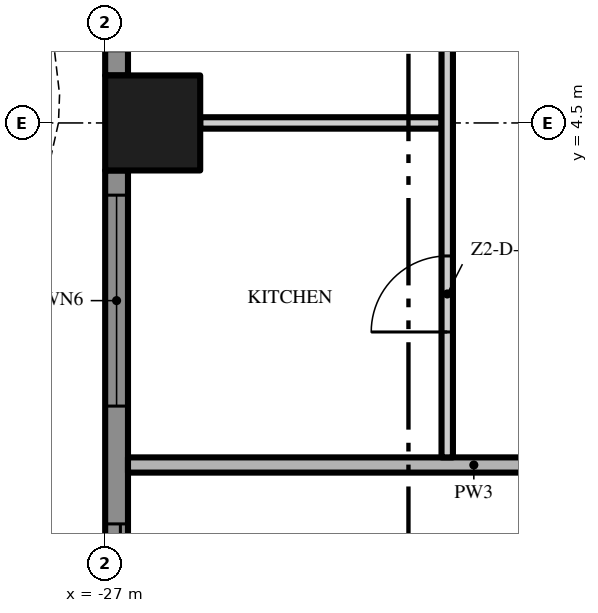
"""IFC4 building model, lengths in metres.
Left out: names, types, materials, properties, quantities, classifications, styles, units other than length and angle.
Written with IfcOpenShell. Run it as: python <this file> out.ifc"""

import sys

from ifc_helpers import new_model, si_unit, direction, frame, frame_2d, origin, origin_2d, place, context, subcontext, project, spatial, polyline, rectangle, outline, extrude, element, fill, save


model = new_model("IFC4")
c1 = context("Model", 3, precision=1e-05, world=origin(), true_north=direction((0.0, 1.0)))
c2 = subcontext(c1, "Body", "Model", "MODEL_VIEW")
j1 = project(units=[si_unit("LENGTHUNIT", "METRE"), si_unit("PLANEANGLEUNIT", "RADIAN")], contexts=[c1])
p1 = place(None, origin())
s1 = spatial("IfcSite", under=j1, at=p1, CompositionType="ELEMENT")
p2 = place(p1, origin())
s2 = spatial("IfcBuilding", under=s1, at=p2, CompositionType="ELEMENT")
p3 = place(p2, frame((0.0, 0.0, 103.6)))
s3 = spatial("IfcBuildingStorey", under=s2, at=p3, CompositionType="ELEMENT", Elevation=103.6)
p4 = place(p3, frame((-26.375, 4.5, 0.0), z_axis=(0.0, 0.0, 1.0), x_axis=(1.0, 0.0, 0.0)))
e1 = element("IfcColumn", 1, at=p4, inside=s3, PredefinedType="COLUMN", context=c2, shape_type="SweptSolid", body=[
    extrude(rectangle(XDim=1.25, YDim=1.25, at=origin_2d()), origin(), (0.0, 0.0, 1.0), 3.5),
])
p5 = place(p3, frame((-26.85, 5.125, 0.0), z_axis=(0.0, 0.0, 1.0), x_axis=(0.0, 1.0, 0.0)))
e2 = element("IfcWall", 2, at=p5, inside=s3, PredefinedType="SOLIDWALL", context=c2, shape_type="SweptSolid", body=[
    extrude(rectangle(XDim=7.75, YDim=0.3, at=frame_2d((3.875, 0.0))), origin(), (0.0, 0.0, 1.0), 3.5),
])
p6 = place(p5, frame((4.65, 0.0, 0.0)))
e3 = element("IfcOpeningElement", 3, at=p6, cuts=e2, PredefinedType="OPENING", context=c2, shape_type="SweptSolid", body=[
    extrude(rectangle(XDim=2.775, YDim=2.4, at=frame_2d((1.387, 1.2))), frame((0.0, 0.16, 0.0), z_axis=(0.0, -1.0, 0.0), x_axis=(1.0, 0.0, 0.0)), (0.0, 0.0, 1.0), 0.32),
])
p7 = place(p5, frame((0.325, 0.0, 0.45)))
e4 = element("IfcOpeningElement", 4, at=p7, cuts=e2, PredefinedType="OPENING", context=c2, shape_type="SweptSolid", body=[
    extrude(rectangle(XDim=2.775, YDim=2.65, at=frame_2d((1.387, 1.325))), frame((0.0, 0.16, 0.0), z_axis=(0.0, -1.0, 0.0), x_axis=(1.0, 0.0, 0.0)), (0.0, 0.0, 1.0), 0.32),
])
p8 = place(p3, frame((-26.85, -3.875, 0.0), z_axis=(0.0, 0.0, 1.0), x_axis=(0.0, 1.0, 0.0)))
e5 = element("IfcWall", 5, at=p8, inside=s3, PredefinedType="SOLIDWALL", context=c2, shape_type="SweptSolid", body=[
    extrude(rectangle(XDim=7.75, YDim=0.3, at=frame_2d((3.875, 0.0))), origin(), (0.0, 0.0, 1.0), 3.5),
])
p9 = place(p8, frame((4.65, 0.0, 0.45)))
e6 = element("IfcOpeningElement", 6, at=p9, cuts=e5, PredefinedType="OPENING", context=c2, shape_type="SweptSolid", body=[
    extrude(rectangle(XDim=2.775, YDim=2.65, at=frame_2d((1.387, 1.325))), frame((0.0, 0.16, 0.0), z_axis=(0.0, -1.0, 0.0), x_axis=(1.0, 0.0, 0.0)), (0.0, 0.0, 1.0), 0.32),
])
p10 = place(p8, frame((0.325, 0.0, 0.0)))
e7 = element("IfcOpeningElement", 7, at=p10, cuts=e5, PredefinedType="OPENING", context=c2, shape_type="SweptSolid", body=[
    extrude(rectangle(XDim=2.775, YDim=2.4, at=frame_2d((1.387, 1.2))), frame((0.0, 0.16, 0.0), z_axis=(0.0, -1.0, 0.0), x_axis=(1.0, 0.0, 0.0)), (0.0, 0.0, 1.0), 0.32),
])
p11 = place(p3, origin())
e8 = element("IfcWall", 8, at=p11, inside=s3, PredefinedType="USERDEFINED", context=c2, shape_type="SweptSolid", body=[
    extrude(outline(polyline([(-27.951, 18.0), (-28.612, 16.5), (-29.345, 15.0), (-29.869, 13.5), (-30.0, 12.375), (-29.985, 12.0), (-29.649, 10.5), (-28.988, 9.0), (-28.255, 7.5), (-27.731, 6.0), (-27.6, 4.875), (-27.615, 4.5), (-27.951, 3.0), (-28.612, 1.5), (-29.345, 0.0), (-29.869, -1.5), (-30.0, -2.625), (-29.985, -3.0), (-29.649, -4.5), (-28.988, -6.0), (-28.255, -7.5), (-27.731, -9.0), (-27.6, -10.125), (-27.615, -10.5), (-27.951, -12.0), (-28.612, -13.5), (-29.345, -15.0), (-29.869, -16.5), (-30.0, -17.625), (-29.985, -18.0), (-29.735, -17.99), (-29.749, -17.635), (-29.624, -16.556), (-29.114, -15.096), (-28.385, -13.605), (-27.713, -12.079), (-27.366, -10.533), (-27.349, -10.115), (-27.486, -8.944), (-28.024, -7.404), (-28.761, -5.895), (-29.41, -4.421), (-29.736, -2.967), (-29.749, -2.635), (-29.624, -1.556), (-29.114, -0.096), (-28.385, 1.395), (-27.713, 2.921), (-27.366, 4.467), (-27.349, 4.885), (-27.486, 6.056), (-28.024, 7.596), (-28.761, 9.105), (-29.41, 10.579), (-29.736, 12.033), (-29.749, 12.365), (-29.624, 13.444), (-29.114, 14.904), (-28.385, 16.395), (-27.723, 17.899), (-27.951, 18.0)])), origin(), (0.0, 0.0, 1.0), 0.9),
])
p12 = place(p3, frame((-26.7, 0.0, 0.0), z_axis=(0.0, 0.0, 1.0), x_axis=(1.0, 0.0, 0.0)))
e9 = element("IfcWall", 9, at=p12, inside=s3, PredefinedType="PARTITIONING", context=c2, shape_type="SweptSolid", body=[
    extrude(rectangle(XDim=9.1, YDim=0.2, at=frame_2d((4.55, 0.0))), origin(), (0.0, 0.0, 1.0), 3.5),
])
p13 = place(p3, frame((-25.75, 4.5, 0.0), z_axis=(0.0, 0.0, 1.0), x_axis=(1.0, 0.0, 0.0)))
e10 = element("IfcWall", 10, at=p13, inside=s3, PredefinedType="PARTITIONING", context=c2, shape_type="SweptSolid", body=[
    extrude(rectangle(XDim=3.175, YDim=0.15, at=frame_2d((1.587, 0.0))), origin(), (0.0, 0.0, 1.0), 3.5),
])
p14 = place(p3, frame((-22.5, 0.1, 0.0), z_axis=(0.0, 0.0, 1.0), x_axis=(0.0, 1.0, 0.0)))
e11 = element("IfcWall", 11, at=p14, inside=s3, PredefinedType="PARTITIONING", context=c2, shape_type="SweptSolid", body=[
    extrude(rectangle(XDim=17.275, YDim=0.15, at=frame_2d((8.637, 0.0))), origin(), (0.0, 0.0, 1.0), 3.5),
])
p15 = place(p14, frame((1.65, 0.0, 0.0)))
e12 = element("IfcOpeningElement", 12, at=p15, cuts=e11, PredefinedType="OPENING", context=c2, shape_type="SweptSolid", body=[
    extrude(rectangle(XDim=1.0, YDim=2.4, at=frame_2d((0.5, 1.2))), frame((0.0, 0.085, 0.0), z_axis=(0.0, -1.0, 0.0), x_axis=(1.0, 0.0, 0.0)), (0.0, 0.0, 1.0), 0.17),
])
p16 = place(p14, frame((8.0, 0.0, 0.0)))
e13 = element("IfcOpeningElement", 13, at=p16, cuts=e11, PredefinedType="OPENING", context=c2, shape_type="SweptSolid", body=[
    extrude(rectangle(XDim=1.8, YDim=2.4, at=frame_2d((0.9, 1.2))), frame((0.0, 0.085, 0.0), z_axis=(0.0, -1.0, 0.0), x_axis=(1.0, 0.0, 0.0)), (0.0, 0.0, 1.0), 0.17),
])
p17 = place(p9, origin())
e14 = element("IfcWindow", 14, at=p17, inside=s3, PartitioningType="SINGLE_PANEL", PredefinedType="WINDOW", context=c2, shape_type="SweptSolid", body=[
    extrude(rectangle(XDim=2.775, YDim=2.65, at=frame_2d((1.387, 1.325))), frame((0.0, 0.03, 0.0), z_axis=(0.0, -1.0, 0.0), x_axis=(1.0, 0.0, 0.0)), (0.0, 0.0, 1.0), 0.06),
])
fill(e6, e14)
p18 = place(p10, origin())
e15 = element("IfcDoor", 15, at=p18, inside=s3, OperationType="SINGLE_SWING_LEFT", PredefinedType="DOOR", context=c2, shape_type="SweptSolid", body=[
    extrude(rectangle(XDim=2.775, YDim=2.4, at=frame_2d((1.387, 1.2))), frame((0.0, 0.025, 0.0), z_axis=(0.0, -1.0, 0.0), x_axis=(1.0, 0.0, 0.0)), (0.0, 0.0, 1.0), 0.05),
])
fill(e7, e15)
p19 = place(p15, origin())
e16 = element("IfcDoor", 16, at=p19, inside=s3, OperationType="SINGLE_SWING_LEFT", PredefinedType="DOOR", context=c2, shape_type="SweptSolid", body=[
    extrude(rectangle(XDim=1.0, YDim=2.4, at=frame_2d((0.5, 1.2))), frame((0.0, 0.025, 0.0), z_axis=(0.0, -1.0, 0.0), x_axis=(1.0, 0.0, 0.0)), (0.0, 0.0, 1.0), 0.05),
])
fill(e12, e16)
save(model, sys.argv[1])
